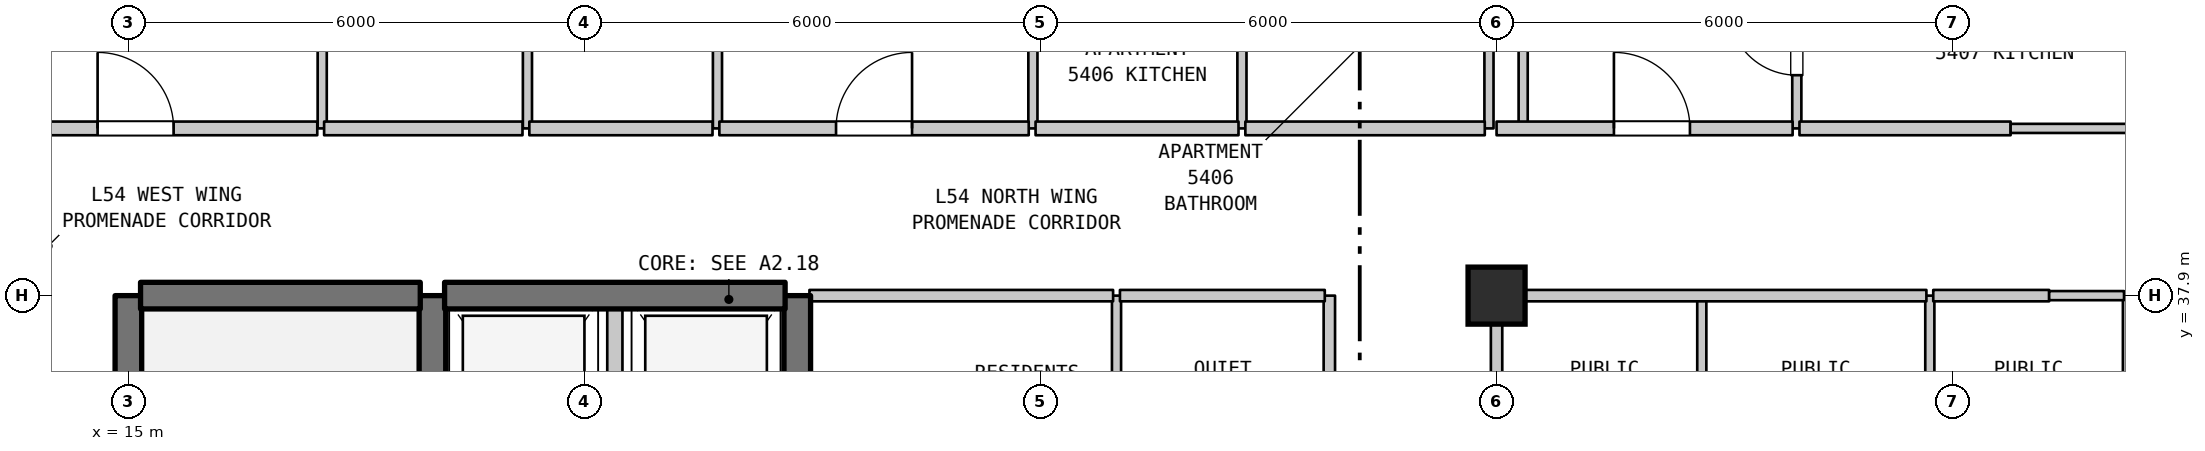
"""IFC4 building model, lengths in metres.
Left out: names, types, materials, properties, quantities, classifications, styles, units other than length and angle.
Written with IfcOpenShell. Run it as: python <this file> out.ifc"""

import sys

from ifc_helpers import new_model, si_unit, direction, frame, frame_2d, origin, origin_2d, place, context, subcontext, project, spatial, rectangle, extrude, element, fill, save


model = new_model("IFC4")
c1 = context("Model", 3, precision=1e-05, world=origin(), true_north=direction((0.0, 1.0)))
c2 = subcontext(c1, "Body", "Model", "MODEL_VIEW")
j1 = project(units=[si_unit("LENGTHUNIT", "METRE"), si_unit("PLANEANGLEUNIT", "RADIAN")], contexts=[c1])
p1 = place(None, origin())
s1 = spatial("IfcSite", under=j1, at=p1, CompositionType="ELEMENT")
p2 = place(p1, origin())
s2 = spatial("IfcBuilding", under=s1, at=p2, CompositionType="ELEMENT")
p3 = place(p2, frame((0.0, 0.0, 218.0)))
s3 = spatial("IfcBuildingStorey", under=s2, at=p3, CompositionType="ELEMENT", Elevation=218.0)
p4 = place(p3, frame((33.0, 37.9, 0.0), z_axis=(0.0, 0.0, 1.0), x_axis=(1.0, 0.0, 0.0)))
e1 = element("IfcColumn", 1, at=p4, inside=s3, PredefinedType="COLUMN", context=c2, shape_type="SweptSolid", body=[
    extrude(rectangle(XDim=0.75, YDim=0.75, at=origin_2d()), origin(), (0.0, 0.0, 1.0), 4.8),
])
p5 = place(p3, frame((15.0, 31.1, 0.0), z_axis=(0.0, 0.0, 1.0), x_axis=(0.0, 1.0, 0.0)))
e2 = element("IfcWall", 2, at=p5, inside=s3, PredefinedType="SHEAR", context=c2, shape_type="SweptSolid", body=[
    extrude(rectangle(XDim=6.8, YDim=0.35, at=frame_2d((3.4, 0.0))), origin(), (0.0, 0.0, 1.0), 4.49),
])
p6 = place(p3, frame((17.55, 40.1, 0.0), z_axis=(0.0, 0.0, 1.0), x_axis=(0.0, 1.0, 0.0)))
e3 = element("IfcWall", 3, at=p6, inside=s3, PredefinedType="PARTITIONING", context=c2, shape_type="SweptSolid", body=[
    extrude(rectangle(XDim=3.2, YDim=0.12, at=frame_2d((1.6, 0.0))), origin(), (0.0, 0.0, 1.0), 4.49),
])
p7 = place(p3, frame((19.0, 35.0, 0.0), z_axis=(0.0, 0.0, 1.0), x_axis=(0.0, 1.0, 0.0)))
e4 = element("IfcWall", 4, at=p7, inside=s3, PredefinedType="SHEAR", context=c2, shape_type="SweptSolid", body=[
    extrude(rectangle(XDim=2.9, YDim=0.35, at=frame_2d((1.45, 0.0))), origin(), (0.0, 0.0, 1.0), 4.49),
])
p8 = place(p3, frame((20.25, 40.1, 0.0), z_axis=(0.0, 0.0, 1.0), x_axis=(0.0, 1.0, 0.0)))
e5 = element("IfcWall", 5, at=p8, inside=s3, PredefinedType="PARTITIONING", context=c2, shape_type="SweptSolid", body=[
    extrude(rectangle(XDim=3.2, YDim=0.12, at=frame_2d((1.6, 0.0))), origin(), (0.0, 0.0, 1.0), 4.49),
])
p9 = place(p8, frame((1.15, 0.0, 0.0)))
e6 = element("IfcOpeningElement", 6, at=p9, cuts=e5, PredefinedType="OPENING", context=c2, shape_type="SweptSolid", body=[
    extrude(rectangle(XDim=0.9, YDim=2.15, at=frame_2d((0.45, 1.075))), frame((0.0, 0.07, 0.0), z_axis=(0.0, -1.0, 0.0), x_axis=(1.0, 0.0, 0.0)), (0.0, 0.0, 1.0), 0.14),
])
p10 = place(p3, frame((21.4, 35.0, 0.0), z_axis=(0.0, 0.0, 1.0), x_axis=(0.0, 1.0, 0.0)))
e7 = element("IfcWall", 7, at=p10, inside=s3, PredefinedType="STANDARD", context=c2, shape_type="SweptSolid", body=[
    extrude(rectangle(XDim=2.9, YDim=0.2, at=frame_2d((1.45, 0.0))), origin(), (0.0, 0.0, 1.0), 4.49),
])
p11 = place(p3, frame((22.75, 40.1, 0.0), z_axis=(0.0, 0.0, 1.0), x_axis=(0.0, 1.0, 0.0)))
e8 = element("IfcWall", 8, at=p11, inside=s3, PredefinedType="PARTITIONING", context=c2, shape_type="SweptSolid", body=[
    extrude(rectangle(XDim=13.79, YDim=0.12, at=frame_2d((6.895, 0.0))), origin(), (0.0, 0.0, 1.0), 4.49),
])
p12 = place(p3, frame((23.8, 35.0, 0.0), z_axis=(0.0, 0.0, 1.0), x_axis=(0.0, 1.0, 0.0)))
e9 = element("IfcWall", 9, at=p12, inside=s3, PredefinedType="SHEAR", context=c2, shape_type="SweptSolid", body=[
    extrude(rectangle(XDim=2.9, YDim=0.35, at=frame_2d((1.45, 0.0))), origin(), (0.0, 0.0, 1.0), 4.49),
])
p13 = place(p3, frame((26.9, 40.1, 0.0), z_axis=(0.0, 0.0, 1.0), x_axis=(0.0, 1.0, 0.0)))
e10 = element("IfcWall", 10, at=p13, inside=s3, PredefinedType="PARTITIONING", context=c2, shape_type="SweptSolid", body=[
    extrude(rectangle(XDim=2.3, YDim=0.12, at=frame_2d((1.15, 0.0))), origin(), (0.0, 0.0, 1.0), 4.49),
])
p14 = place(p3, frame((28.0, 35.0, 0.0), z_axis=(0.0, 0.0, 1.0), x_axis=(0.0, 1.0, 0.0)))
e11 = element("IfcWall", 11, at=p14, inside=s3, PredefinedType="PARTITIONING", context=c2, shape_type="SweptSolid", body=[
    extrude(rectangle(XDim=2.9, YDim=0.12, at=frame_2d((1.45, 0.0))), origin(), (0.0, 0.0, 1.0), 4.49),
])
p15 = place(p3, frame((29.65, 40.1, 0.0), z_axis=(0.0, 0.0, 1.0), x_axis=(0.0, 1.0, 0.0)))
e12 = element("IfcWall", 12, at=p15, inside=s3, PredefinedType="PARTITIONING", context=c2, shape_type="SweptSolid", body=[
    extrude(rectangle(XDim=2.3, YDim=0.12, at=frame_2d((1.15, 0.0))), origin(), (0.0, 0.0, 1.0), 4.49),
])
p16 = place(p3, frame((30.8, 35.0, 0.0), z_axis=(0.0, 0.0, 1.0), x_axis=(0.0, 1.0, 0.0)))
e13 = element("IfcWall", 13, at=p16, inside=s3, PredefinedType="STANDARD", context=c2, shape_type="SweptSolid", body=[
    extrude(rectangle(XDim=2.9, YDim=0.15, at=frame_2d((1.45, 0.0))), origin(), (0.0, 0.0, 1.0), 4.49),
])
p17 = place(p3, frame((32.9, 40.1, 0.0), z_axis=(0.0, 0.0, 1.0), x_axis=(0.0, 1.0, 0.0)))
e14 = element("IfcWall", 14, at=p17, inside=s3, PredefinedType="PARTITIONING", context=c2, shape_type="SweptSolid", body=[
    extrude(rectangle(XDim=2.3, YDim=0.12, at=frame_2d((1.15, 0.0))), origin(), (0.0, 0.0, 1.0), 3.89),
])
p18 = place(p3, frame((33.0, 35.0, 0.0), z_axis=(0.0, 0.0, 1.0), x_axis=(0.0, 1.0, 0.0)))
e15 = element("IfcWall", 15, at=p18, inside=s3, PredefinedType="STANDARD", context=c2, shape_type="SweptSolid", body=[
    extrude(rectangle(XDim=2.9, YDim=0.15, at=frame_2d((1.45, 0.0))), origin(), (0.0, 0.0, 1.0), 3.99),
])
p19 = place(p3, frame((33.35, 40.1, 0.0), z_axis=(0.0, 0.0, 1.0), x_axis=(0.0, 1.0, 0.0)))
e16 = element("IfcWall", 16, at=p19, inside=s3, PredefinedType="PARTITIONING", context=c2, shape_type="SweptSolid", body=[
    extrude(rectangle(XDim=13.79, YDim=0.12, at=frame_2d((6.895, 0.0))), origin(), (0.0, 0.0, 1.0), 4.49),
])
p20 = place(p3, frame((35.7, 35.0, 0.0), z_axis=(0.0, 0.0, 1.0), x_axis=(0.0, 1.0, 0.0)))
e17 = element("IfcWall", 17, at=p20, inside=s3, PredefinedType="PARTITIONING", context=c2, shape_type="SweptSolid", body=[
    extrude(rectangle(XDim=2.9, YDim=0.12, at=frame_2d((1.45, 0.0))), origin(), (0.0, 0.0, 1.0), 4.49),
])
p21 = place(p3, frame((36.95, 40.1, 0.0), z_axis=(0.0, 0.0, 1.0), x_axis=(0.0, 1.0, 0.0)))
e18 = element("IfcWall", 18, at=p21, inside=s3, PredefinedType="PARTITIONING", context=c2, shape_type="SweptSolid", body=[
    extrude(rectangle(XDim=2.3, YDim=0.12, at=frame_2d((1.15, 0.0))), origin(), (0.0, 0.0, 1.0), 4.49),
])
p22 = place(p21, frame((0.7, 0.0, 0.0)))
e19 = element("IfcOpeningElement", 19, at=p22, cuts=e18, PredefinedType="OPENING", context=c2, shape_type="SweptSolid", body=[
    extrude(rectangle(XDim=0.9, YDim=2.15, at=frame_2d((0.45, 1.075))), frame((0.0, 0.07, 0.0), z_axis=(0.0, -1.0, 0.0), x_axis=(1.0, 0.0, 0.0)), (0.0, 0.0, 1.0), 0.14),
])
for number, where, z_axis, x_axis in (
    (20, (38.7, 35.0, 0.0), (0.0, 0.0, 1.0), (0.0, 1.0, 0.0)),
    (21, (41.3, 35.0, 0.0), (0.0, 0.0, 1.0), (0.0, 1.0, 0.0)),
):
    element("IfcWall", number, at=place(p3, frame(where, z_axis=z_axis, x_axis=x_axis)), inside=s3, PredefinedType="PARTITIONING", context=c2, shape_type="SweptSolid", body=[
        extrude(rectangle(XDim=2.9, YDim=0.12, at=frame_2d((1.45, 0.0))), origin(), (0.0, 0.0, 1.0), 4.49),
    ])
p23 = place(p3, frame((15.16, 37.9, 0.0), z_axis=(0.0, 0.0, 1.0), x_axis=(1.0, 0.0, 0.0)))
e22 = element("IfcWall", 22, at=p23, inside=s3, PredefinedType="SHEAR", context=c2, shape_type="SweptSolid", body=[
    extrude(rectangle(XDim=3.68, YDim=0.35, at=frame_2d((1.84, 0.0))), origin(), (0.0, 0.0, 1.0), 4.49),
])
p24 = place(p3, frame((19.16, 37.9, 0.0), z_axis=(0.0, 0.0, 1.0), x_axis=(1.0, 0.0, 0.0)))
e23 = element("IfcWall", 23, at=p24, inside=s3, PredefinedType="SHEAR", context=c2, shape_type="SweptSolid", body=[
    extrude(rectangle(XDim=4.48, YDim=0.35, at=frame_2d((2.24, 0.0))), origin(), (0.0, 0.0, 1.0), 4.49),
])
p25 = place(p3, frame((23.96, 37.9, 0.0), z_axis=(0.0, 0.0, 1.0), x_axis=(1.0, 0.0, 0.0)))
e24 = element("IfcWall", 24, at=p25, inside=s3, PredefinedType="STANDARD", context=c2, shape_type="SweptSolid", body=[
    extrude(rectangle(XDim=3.995, YDim=0.15, at=frame_2d((1.998, 0.0))), origin(), (0.0, 0.0, 1.0), 3.99),
])
p26 = place(p3, frame((28.045, 37.9, 0.0), z_axis=(0.0, 0.0, 1.0), x_axis=(1.0, 0.0, 0.0)))
e25 = element("IfcWall", 25, at=p26, inside=s3, PredefinedType="STANDARD", context=c2, shape_type="SweptSolid", body=[
    extrude(rectangle(XDim=2.695, YDim=0.15, at=frame_2d((1.348, 0.0))), origin(), (0.0, 0.0, 1.0), 3.99),
])
p27 = place(p3, frame((33.06, 37.9, 0.0), z_axis=(0.0, 0.0, 1.0), x_axis=(1.0, 0.0, 0.0)))
e26 = element("IfcWall", 26, at=p27, inside=s3, PredefinedType="STANDARD", context=c2, shape_type="SweptSolid", body=[
    extrude(rectangle(XDim=5.595, YDim=0.15, at=frame_2d((2.797, 0.0))), origin(), (0.0, 0.0, 1.0), 4.49),
])
p28 = place(p3, frame((38.745, 37.9, 0.0), z_axis=(0.0, 0.0, 1.0), x_axis=(1.0, 0.0, 0.0)))
e27 = element("IfcWall", 27, at=p28, inside=s3, PredefinedType="STANDARD", context=c2, shape_type="SweptSolid", body=[
    extrude(rectangle(XDim=1.525, YDim=0.15, at=frame_2d((0.762, 0.0))), origin(), (0.0, 0.0, 1.0), 4.49),
])
p29 = place(p3, frame((40.27, 37.9, 0.0), z_axis=(0.0, 0.0, 1.0), x_axis=(1.0, 0.0, 0.0)))
e28 = element("IfcWall", 28, at=p29, inside=s3, PredefinedType="PARTITIONING", context=c2, shape_type="SweptSolid", body=[
    extrude(rectangle(XDim=0.985, YDim=0.12, at=frame_2d((0.492, 0.0))), origin(), (0.0, 0.0, 1.0), 4.49),
])
p30 = place(p3, frame((12.875, 40.1, 0.0), z_axis=(0.0, 0.0, 1.0), x_axis=(1.0, 0.0, 0.0)))
e29 = element("IfcWall", 29, at=p30, inside=s3, PredefinedType="STANDARD", context=c2, shape_type="SweptSolid", body=[
    extrude(rectangle(XDim=4.61, YDim=0.18, at=frame_2d((2.305, 0.0))), origin(), (0.0, 0.0, 1.0), 4.49),
])
p31 = place(p30, frame((1.72, 0.0, 0.0)))
e30 = element("IfcOpeningElement", 30, at=p31, cuts=e29, PredefinedType="OPENING", context=c2, shape_type="SweptSolid", body=[
    extrude(rectangle(XDim=1.0, YDim=2.15, at=frame_2d((0.5, 1.075))), frame((0.0, 0.1, 0.0), z_axis=(0.0, -1.0, 0.0), x_axis=(1.0, 0.0, 0.0)), (0.0, 0.0, 1.0), 0.2),
])
p32 = place(p3, frame((17.575, 40.1, 0.0), z_axis=(0.0, 0.0, 1.0), x_axis=(1.0, 0.0, 0.0)))
e31 = element("IfcWall", 31, at=p32, inside=s3, PredefinedType="STANDARD", context=c2, shape_type="SweptSolid", body=[
    extrude(rectangle(XDim=2.61, YDim=0.18, at=frame_2d((1.305, 0.0))), origin(), (0.0, 0.0, 1.0), 4.49),
])
p33 = place(p3, frame((20.275, 40.1, 0.0), z_axis=(0.0, 0.0, 1.0), x_axis=(1.0, 0.0, 0.0)))
e32 = element("IfcWall", 32, at=p33, inside=s3, PredefinedType="STANDARD", context=c2, shape_type="SweptSolid", body=[
    extrude(rectangle(XDim=2.41, YDim=0.18, at=frame_2d((1.205, 0.0))), origin(), (0.0, 0.0, 1.0), 4.49),
])
p34 = place(p3, frame((22.775, 40.1, 0.0), z_axis=(0.0, 0.0, 1.0), x_axis=(1.0, 0.0, 0.0)))
e33 = element("IfcWall", 33, at=p34, inside=s3, PredefinedType="STANDARD", context=c2, shape_type="SweptSolid", body=[
    extrude(rectangle(XDim=4.07, YDim=0.18, at=frame_2d((2.035, 0.0))), origin(), (0.0, 0.0, 1.0), 4.49),
])
p35 = place(p34, frame((1.535, 0.0, 0.0)))
e34 = element("IfcOpeningElement", 34, at=p35, cuts=e33, PredefinedType="OPENING", context=c2, shape_type="SweptSolid", body=[
    extrude(rectangle(XDim=1.0, YDim=2.15, at=frame_2d((0.5, 1.075))), frame((0.0, 0.1, 0.0), z_axis=(0.0, -1.0, 0.0), x_axis=(1.0, 0.0, 0.0)), (0.0, 0.0, 1.0), 0.2),
])
p36 = place(p3, frame((26.935, 40.1, 0.0), z_axis=(0.0, 0.0, 1.0), x_axis=(1.0, 0.0, 0.0)))
e35 = element("IfcWall", 35, at=p36, inside=s3, PredefinedType="STANDARD", context=c2, shape_type="SweptSolid", body=[
    extrude(rectangle(XDim=2.67, YDim=0.18, at=frame_2d((1.335, 0.0))), origin(), (0.0, 0.0, 1.0), 4.49),
])
p37 = place(p3, frame((29.695, 40.1, 0.0), z_axis=(0.0, 0.0, 1.0), x_axis=(1.0, 0.0, 0.0)))
e36 = element("IfcWall", 36, at=p37, inside=s3, PredefinedType="STANDARD", context=c2, shape_type="SweptSolid", body=[
    extrude(rectangle(XDim=3.15, YDim=0.18, at=frame_2d((1.575, 0.0))), origin(), (0.0, 0.0, 1.0), 4.49),
])
p38 = place(p3, frame((33.0, 40.1, 0.0), z_axis=(0.0, 0.0, 1.0), x_axis=(1.0, 0.0, 0.0)))
e37 = element("IfcWall", 37, at=p38, inside=s3, PredefinedType="STANDARD", context=c2, shape_type="SweptSolid", body=[
    extrude(rectangle(XDim=3.895, YDim=0.18, at=frame_2d((1.948, 0.0))), origin(), (0.0, 0.0, 1.0), 4.49),
])
p39 = place(p38, frame((1.544, 0.0, 0.0)))
e38 = element("IfcOpeningElement", 38, at=p39, cuts=e37, PredefinedType="OPENING", context=c2, shape_type="SweptSolid", body=[
    extrude(rectangle(XDim=1.0, YDim=2.15, at=frame_2d((0.5, 1.075))), frame((0.0, 0.1, 0.0), z_axis=(0.0, -1.0, 0.0), x_axis=(1.0, 0.0, 0.0)), (0.0, 0.0, 1.0), 0.2),
])
p40 = place(p3, frame((36.985, 40.1, 0.0), z_axis=(0.0, 0.0, 1.0), x_axis=(1.0, 0.0, 0.0)))
e39 = element("IfcWall", 39, at=p40, inside=s3, PredefinedType="STANDARD", context=c2, shape_type="SweptSolid", body=[
    extrude(rectangle(XDim=2.778, YDim=0.18, at=frame_2d((1.389, 0.0))), origin(), (0.0, 0.0, 1.0), 4.49),
])
p41 = place(p3, frame((39.763, 40.1, 0.0), z_axis=(0.0, 0.0, 1.0), x_axis=(1.0, 0.0, 0.0)))
e40 = element("IfcWall", 40, at=p41, inside=s3, PredefinedType="PARTITIONING", context=c2, shape_type="SweptSolid", body=[
    extrude(rectangle(XDim=2.412, YDim=0.12, at=frame_2d((1.206, 0.0))), origin(), (0.0, 0.0, 1.0), 4.49),
])
p42 = place(p22, origin())
e41 = element("IfcDoor", 41, at=p42, inside=s3, OperationType="SINGLE_SWING_RIGHT", PredefinedType="DOOR", context=c2, shape_type="SweptSolid", body=[
    extrude(rectangle(XDim=0.9, YDim=2.15, at=frame_2d((0.45, 1.075))), frame((0.0, 0.025, 0.0), z_axis=(0.0, -1.0, 0.0), x_axis=(1.0, 0.0, 0.0)), (0.0, 0.0, 1.0), 0.05),
])
fill(e19, e41)
p43 = place(p31, origin())
e42 = element("IfcDoor", 42, at=p43, inside=s3, OperationType="SINGLE_SWING_LEFT", PredefinedType="DOOR", context=c2, shape_type="SweptSolid", body=[
    extrude(rectangle(XDim=1.0, YDim=2.15, at=frame_2d((0.5, 1.075))), frame((0.0, 0.025, 0.0), z_axis=(0.0, -1.0, 0.0), x_axis=(1.0, 0.0, 0.0)), (0.0, 0.0, 1.0), 0.05),
])
fill(e30, e42)
p44 = place(p35, origin())
e43 = element("IfcDoor", 43, at=p44, inside=s3, OperationType="SINGLE_SWING_RIGHT", PredefinedType="DOOR", context=c2, shape_type="SweptSolid", body=[
    extrude(rectangle(XDim=1.0, YDim=2.15, at=frame_2d((0.5, 1.075))), frame((0.0, 0.025, 0.0), z_axis=(0.0, -1.0, 0.0), x_axis=(1.0, 0.0, 0.0)), (0.0, 0.0, 1.0), 0.05),
])
fill(e34, e43)
p45 = place(p39, origin())
e44 = element("IfcDoor", 44, at=p45, inside=s3, OperationType="SINGLE_SWING_LEFT", PredefinedType="DOOR", context=c2, shape_type="SweptSolid", body=[
    extrude(rectangle(XDim=1.0, YDim=2.15, at=frame_2d((0.5, 1.075))), frame((0.0, 0.025, 0.0), z_axis=(0.0, -1.0, 0.0), x_axis=(1.0, 0.0, 0.0)), (0.0, 0.0, 1.0), 0.05),
])
fill(e38, e44)
save(model, sys.argv[1])
